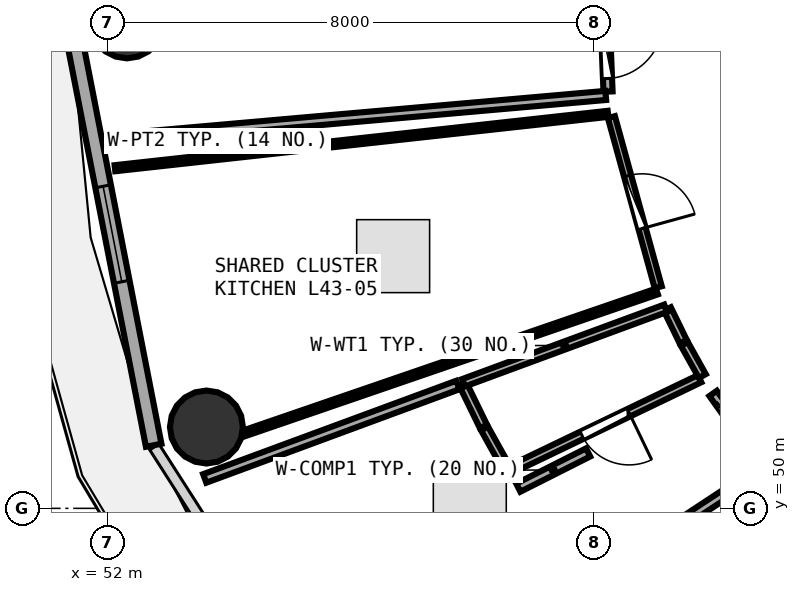
"""IFC4 building model, lengths in metres.
Left out: names, types, materials, properties, quantities, classifications, styles, units other than length and angle.
Written with IfcOpenShell. Run it as: python <this file> out.ifc"""

import sys

from ifc_helpers import new_model, si_unit, direction, frame, frame_2d, origin, origin_2d, place, context, subcontext, project, spatial, rectangle, circle, extrude, element, fill, save


model = new_model("IFC4")
c1 = context("Model", 3, precision=1e-05, world=origin(), true_north=direction((0.0, 1.0)))
c2 = subcontext(c1, "Body", "Model", "MODEL_VIEW")
j1 = project(units=[si_unit("LENGTHUNIT", "METRE"), si_unit("PLANEANGLEUNIT", "RADIAN")], contexts=[c1])
p1 = place(None, origin())
s1 = spatial("IfcSite", under=j1, at=p1, CompositionType="ELEMENT")
p2 = place(p1, origin())
s2 = spatial("IfcBuilding", under=s1, at=p2, CompositionType="ELEMENT")
p3 = place(p2, frame((0.0, 0.0, 169.35)))
s3 = spatial("IfcBuildingStorey", under=s2, at=p3, CompositionType="ELEMENT", Elevation=169.35)
for number, where, z_axis, x_axis in (
    (1, (52.32, 58.0, 0.0), (0.0, 0.0, 1.0), (1.0, 0.0, 0.0)),
    (2, (53.627, 51.337, 0.0), (0.0, 0.0, 1.0), (1.0, 0.0, 0.0)),
):
    element("IfcColumn", number, at=place(p3, frame(where, z_axis=z_axis, x_axis=x_axis)), inside=s3, PredefinedType="COLUMN", context=c2, shape_type="SweptSolid", body=[
        extrude(circle(Radius=0.6, at=origin_2d()), origin(), (0.0, 0.0, 1.0), 3.75),
    ])
p4 = place(p3, frame((51.403, 57.985, 0.0), z_axis=(0.0, 0.0, 1.0), x_axis=(0.191716984769, -0.981450252306, 0.0)))
e3 = element("IfcWall", 3, at=p4, inside=s3, PredefinedType="SOLIDWALL", context=c2, shape_type="SweptSolid", body=[
    extrude(rectangle(XDim=7.079, YDim=0.26, at=frame_2d((3.54, 0.0))), origin(), (0.0, 0.0, 1.0), 3.475),
])
p5 = place(p4, frame((2.74, 0.0, 0.85)))
e4 = element("IfcOpeningElement", 4, at=p5, cuts=e3, PredefinedType="OPENING", context=c2, shape_type="SweptSolid", body=[
    extrude(rectangle(XDim=1.6, YDim=1.45, at=frame_2d((0.8, 0.725))), frame((0.0, 0.14, 0.0), z_axis=(0.0, -1.0, 0.0), x_axis=(1.0, 0.0, 0.0)), (0.0, 0.0, 1.0), 0.28),
])
p6 = place(p3, frame((60.177, 58.233, 0.0), z_axis=(0.0, 0.0, 1.0), x_axis=(0.040688656331, -0.999171873726, 0.0)))
e5 = element("IfcWall", 5, at=p6, inside=s3, PredefinedType="PARTITIONING", context=c2, shape_type="SweptSolid", body=[
    extrude(rectangle(XDim=1.38, YDim=0.15, at=frame_2d((0.69, 0.0))), origin(), (0.0, 0.0, 1.0), 2.975),
])
p7 = place(p6, frame((0.215, 0.0, 0.0)))
e6 = element("IfcOpeningElement", 6, at=p7, cuts=e5, PredefinedType="OPENING", context=c2, shape_type="SweptSolid", body=[
    extrude(rectangle(XDim=0.95, YDim=2.08, at=frame_2d((0.475, 1.04))), frame((0.0, 0.085, 0.0), z_axis=(0.0, -1.0, 0.0), x_axis=(1.0, 0.0, 0.0)), (0.0, 0.0, 1.0), 0.17),
])
p8 = place(p3, frame((60.288, 56.434, 0.0), z_axis=(0.0, 0.0, 1.0), x_axis=(0.265473290907, -0.964118214647, 0.0)))
e7 = element("IfcWall", 7, at=p8, inside=s3, PredefinedType="PARTITIONING", context=c2, shape_type="SweptSolid", body=[
    extrude(rectangle(XDim=2.901, YDim=0.12, at=frame_2d((1.451, 0.0))), origin(), (0.0, 0.0, 1.0), 3.235),
])
p9 = place(p8, frame((1.001, 0.0, 0.0)))
e8 = element("IfcOpeningElement", 8, at=p9, cuts=e7, PredefinedType="OPENING", context=c2, shape_type="SweptSolid", body=[
    extrude(rectangle(XDim=0.9, YDim=2.08, at=frame_2d((0.45, 1.04))), frame((0.0, 0.07, 0.0), z_axis=(0.0, -1.0, 0.0), x_axis=(1.0, 0.0, 0.0)), (0.0, 0.0, 1.0), 0.14),
])
p10 = place(p3, frame((61.739, 52.132, 0.0), z_axis=(0.0, 0.0, 1.0), x_axis=(-0.901462056275, -0.432858130451, 0.0)))
e9 = element("IfcWall", 9, at=p10, inside=s3, PredefinedType="PLUMBINGWALL", context=c2, shape_type="SweptSolid", body=[
    extrude(rectangle(XDim=3.436, YDim=0.13, at=frame_2d((1.718, 0.0))), origin(), (0.0, 0.0, 1.0), 2.975),
])
p11 = place(p10, frame((1.288, 0.0, 0.0)))
e10 = element("IfcOpeningElement", 10, at=p11, cuts=e9, PredefinedType="OPENING", context=c2, shape_type="SweptSolid", body=[
    extrude(rectangle(XDim=0.86, YDim=2.05, at=frame_2d((0.43, 1.025))), frame((0.0, 0.075, 0.0), z_axis=(0.0, -1.0, 0.0), x_axis=(1.0, 0.0, 0.0)), (0.0, 0.0, 1.0), 0.15),
])
p12 = place(p3, frame((61.961, 51.89, 0.0), z_axis=(0.0, 0.0, 1.0), x_axis=(0.579962011666, -0.814643520213, 0.0)))
e11 = element("IfcWall", 11, at=p12, inside=s3, PredefinedType="PARTITIONING", context=c2, shape_type="SweptSolid", body=[
    extrude(rectangle(XDim=1.43, YDim=0.15, at=frame_2d((0.715, 0.0))), origin(), (0.0, 0.0, 1.0), 2.975),
])
p13 = place(p12, frame((0.24, 0.0, 0.0)))
e12 = element("IfcOpeningElement", 12, at=p13, cuts=e11, PredefinedType="OPENING", context=c2, shape_type="SweptSolid", body=[
    extrude(rectangle(XDim=0.95, YDim=2.08, at=frame_2d((0.475, 1.04))), frame((0.0, 0.085, 0.0), z_axis=(0.0, -1.0, 0.0), x_axis=(1.0, 0.0, 0.0)), (0.0, 0.0, 1.0), 0.17),
])
p14 = place(p3, frame((56.634, 45.784, 0.0), z_axis=(0.0, 0.0, 1.0), x_axis=(0.817143941798, 0.576433672145, 0.0)))
e13 = element("IfcWall", 13, at=p14, inside=s3, PredefinedType="SOLIDWALL", context=c2, shape_type="SweptSolid", body=[
    extrude(rectangle(XDim=7.876, YDim=0.22, at=frame_2d((3.938, 0.0))), origin(), (0.0, 0.0, 1.0), 3.025),
])
p15 = place(p3, frame((60.195, 56.791, 0.0), z_axis=(0.0, 0.0, 1.0), x_axis=(-0.996155607827, -0.087601398364, 0.0)))
e14 = element("IfcWall", 14, at=p15, inside=s3, PredefinedType="PARTITIONING", context=c2, shape_type="SweptSolid", body=[
    extrude(rectangle(XDim=8.163, YDim=0.15, at=frame_2d((4.082, 0.0))), origin(), (0.0, 0.0, 1.0), 3.025),
])
p16 = place(p3, frame((61.036, 53.566, 0.0), z_axis=(0.0, 0.0, 1.0), x_axis=(-0.945736878945, -0.324933463656, 0.0)))
e15 = element("IfcWall", 15, at=p16, inside=s3, PredefinedType="PARTITIONING", context=c2, shape_type="SweptSolid", body=[
    extrude(rectangle(XDim=7.182, YDim=0.1, at=frame_2d((3.591, 0.0))), origin(), (0.0, 0.0, 1.0), 2.975),
])
p17 = place(p3, frame((52.123, 55.594, 0.0), z_axis=(0.0, 0.0, 1.0), x_axis=(0.993977526639, 0.109584107134, 0.0)))
e16 = element("IfcWall", 16, at=p17, inside=s3, PredefinedType="PARTITIONING", context=c2, shape_type="SweptSolid", body=[
    extrude(rectangle(XDim=8.158, YDim=0.1, at=frame_2d((4.079, 0.0))), origin(), (0.0, 0.0, 1.0), 3.025),
])
p18 = place(p3, frame((61.207, 53.279, 0.0), z_axis=(0.0, 0.0, 1.0), x_axis=(0.438415626727, -0.898772350621, 0.0)))
e17 = element("IfcWall", 17, at=p18, inside=s3, PredefinedType="PLUMBINGWALL", context=c2, shape_type="SweptSolid", body=[
    extrude(rectangle(XDim=0.601, YDim=0.13, at=frame_2d((0.3, 0.0))), origin(), (0.0, 0.0, 1.0), 3.235),
])
p19 = place(p3, frame((61.489, 52.704, 0.0), z_axis=(0.0, 0.0, 1.0), x_axis=(0.486979465227, -0.873413418976, 0.0)))
e18 = element("IfcWall", 18, at=p19, inside=s3, PredefinedType="PLUMBINGWALL", context=c2, shape_type="SweptSolid", body=[
    extrude(rectangle(XDim=0.604, YDim=0.13, at=frame_2d((0.302, 0.0))), origin(), (0.0, 0.0, 1.0), 3.48),
])
p20 = place(p3, frame((58.578, 50.636, 0.0), z_axis=(0.0, 0.0, 1.0), x_axis=(-0.486767500689, 0.873531567989, 0.0)))
e19 = element("IfcWall", 19, at=p20, inside=s3, PredefinedType="PLUMBINGWALL", context=c2, shape_type="SweptSolid", body=[
    extrude(rectangle(XDim=0.774, YDim=0.13, at=frame_2d((0.387, 0.0))), origin(), (0.0, 0.0, 1.0), 2.975),
])
p21 = place(p3, frame((58.183, 51.348, 0.0), z_axis=(0.0, 0.0, 1.0), x_axis=(-0.438186235671, 0.898884209934, 0.0)))
e20 = element("IfcWall", 20, at=p21, inside=s3, PredefinedType="PLUMBINGWALL", context=c2, shape_type="SweptSolid", body=[
    extrude(rectangle(XDim=0.77, YDim=0.13, at=frame_2d((0.385, 0.0))), origin(), (0.0, 0.0, 1.0), 2.975),
])
p22 = place(p3, frame((57.856, 52.065, 0.0), z_axis=(0.0, 0.0, 1.0), x_axis=(0.938283087043, 0.345868253198, 0.0)))
e21 = element("IfcWall", 21, at=p22, inside=s3, PredefinedType="PLUMBINGWALL", context=c2, shape_type="SweptSolid", body=[
    extrude(rectangle(XDim=3.542, YDim=0.13, at=frame_2d((1.771, 0.0))), origin(), (0.0, 0.0, 1.0), 3.175),
])
p23 = place(p3, frame((62.792, 50.654, 0.0), z_axis=(0.0, 0.0, 1.0), x_axis=(-0.83517952007, -0.549977426133, 0.0)))
e22 = element("IfcWall", 22, at=p23, inside=s3, PredefinedType="PARTITIONING", context=c2, shape_type="SweptSolid", body=[
    extrude(rectangle(XDim=7.9, YDim=0.15, at=frame_2d((3.95, 0.0))), origin(), (0.0, 0.0, 1.0), 3.025),
])
p24 = place(p3, frame((53.6, 50.492, 0.0), z_axis=(0.0, 0.0, 1.0), x_axis=(0.938127824556, 0.346289163554, 0.0)))
e23 = element("IfcWall", 23, at=p24, inside=s3, PredefinedType="PARTITIONING", context=c2, shape_type="SweptSolid", body=[
    extrude(rectangle(XDim=4.438, YDim=0.15, at=frame_2d((2.219, 0.0))), origin(), (0.0, 0.0, 1.0), 2.975),
])
p25 = place(p3, frame((58.757, 50.34, 0.0), z_axis=(0.0, 0.0, 1.0), x_axis=(0.89282717288, 0.450399422033, 0.0)))
e24 = element("IfcWall", 24, at=p25, inside=s3, PredefinedType="PARTITIONING", context=c2, shape_type="SweptSolid", body=[
    extrude(rectangle(XDim=1.286, YDim=0.15, at=frame_2d((0.643, 0.0))), origin(), (0.0, 0.0, 1.0), 3.175),
])
p26 = place(p5, origin())
e25 = element("IfcWindow", 25, at=p26, inside=s3, PartitioningType="SINGLE_PANEL", PredefinedType="WINDOW", context=c2, shape_type="SweptSolid", body=[
    extrude(rectangle(XDim=1.6, YDim=1.45, at=frame_2d((0.8, 0.725))), frame((0.0, 0.03, 0.0), z_axis=(0.0, -1.0, 0.0), x_axis=(1.0, 0.0, 0.0)), (0.0, 0.0, 1.0), 0.06),
])
fill(e4, e25)
p27 = place(p7, origin())
e26 = element("IfcDoor", 26, at=p27, inside=s3, OperationType="SINGLE_SWING_LEFT", PredefinedType="DOOR", context=c2, shape_type="SweptSolid", body=[
    extrude(rectangle(XDim=0.95, YDim=2.08, at=frame_2d((0.475, 1.04))), frame((0.0, 0.025, 0.0), z_axis=(0.0, -1.0, 0.0), x_axis=(1.0, 0.0, 0.0)), (0.0, 0.0, 1.0), 0.05),
])
fill(e6, e26)
p28 = place(p9, origin())
e27 = element("IfcDoor", 27, at=p28, inside=s3, OperationType="SINGLE_SWING_RIGHT", PredefinedType="DOOR", context=c2, shape_type="SweptSolid", body=[
    extrude(rectangle(XDim=0.9, YDim=2.08, at=frame_2d((0.45, 1.04))), frame((0.0, 0.025, 0.0), z_axis=(0.0, -1.0, 0.0), x_axis=(1.0, 0.0, 0.0)), (0.0, 0.0, 1.0), 0.05),
])
fill(e8, e27)
p29 = place(p11, origin())
e28 = element("IfcDoor", 28, at=p29, inside=s3, OperationType="SINGLE_SWING_LEFT", PredefinedType="DOOR", context=c2, shape_type="SweptSolid", body=[
    extrude(rectangle(XDim=0.86, YDim=2.05, at=frame_2d((0.43, 1.025))), frame((0.0, 0.025, 0.0), z_axis=(0.0, -1.0, 0.0), x_axis=(1.0, 0.0, 0.0)), (0.0, 0.0, 1.0), 0.05),
])
fill(e10, e28)
save(model, sys.argv[1])
